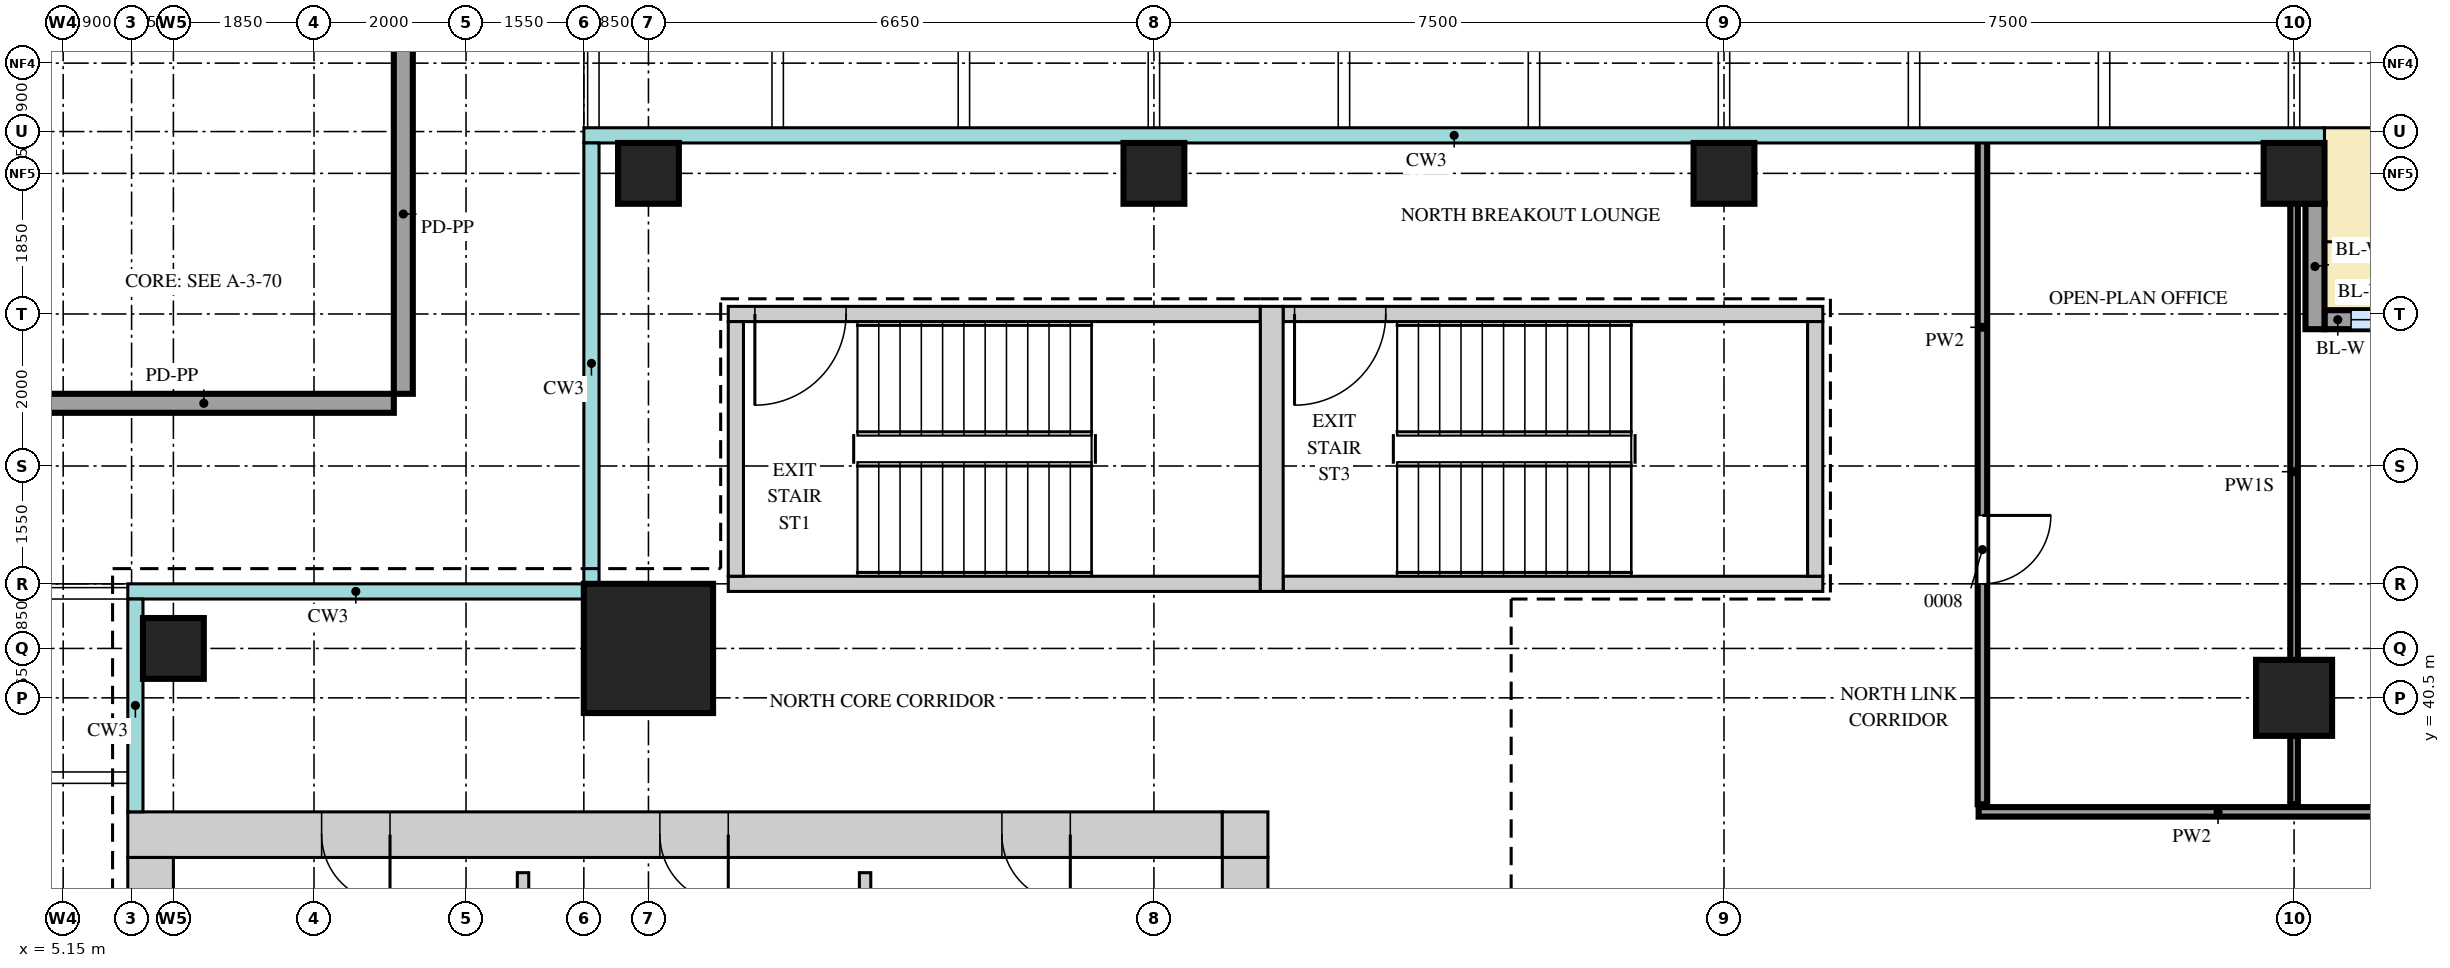
"""IFC4 building model, lengths in metres.
Left out: names, types, materials, properties, quantities, classifications, styles, units other than length and angle.
Written with IfcOpenShell. Run it as: python <this file> out.ifc"""

import sys

from ifc_helpers import new_model, si_unit, direction, frame, frame_2d, origin, origin_2d, place, context, subcontext, project, spatial, rectangle, extrude, source, transform, mapped, element, fill, save


model = new_model("IFC4")
c1 = context("Model", 3, precision=1e-05, world=origin(), true_north=direction((0.0, 1.0)))
c2 = subcontext(c1, "Body", "Model", "MODEL_VIEW")
j1 = project(units=[si_unit("LENGTHUNIT", "METRE"), si_unit("PLANEANGLEUNIT", "RADIAN")], contexts=[c1])
p1 = place(None, origin())
s1 = spatial("IfcSite", under=j1, at=p1, CompositionType="ELEMENT")
p2 = place(p1, origin())
s2 = spatial("IfcBuilding", under=s1, at=p2, CompositionType="ELEMENT")
p3 = place(p2, frame((0.0, 0.0, 282.2)))
s3 = spatial("IfcBuildingStorey", under=s2, at=p3, CompositionType="ELEMENT", Elevation=282.2)
m1 = source(origin(), c2, "Body", "SweptSolid", [
    extrude(rectangle(XDim=14.4, YDim=0.6, at=frame_2d((7.2, 0.0))), origin(), (0.0, 0.0, 1.0), 3.75),
])
p4 = place(p3, frame((6.0, 38.7, 0.0), z_axis=(0.0, 0.0, 1.0), x_axis=(1.0, 0.0, 0.0)))
e1 = element("IfcWall", 1, at=p4, inside=s3, PredefinedType="SHEAR", context=c2, shape_type="MappedRepresentation", body=[
    mapped(m1, transform((0.0, 0.0, 0.0))),
])
m2 = source(origin(), c2, "Body", "SweptSolid", [
    extrude(rectangle(XDim=0.9, YDim=2.1, at=frame_2d((0.45, 1.05))), frame((0.0, 0.31, 0.0), z_axis=(0.0, -1.0, 0.0), x_axis=(1.0, 0.0, 0.0)), (0.0, 0.0, 1.0), 0.62),
])
p5 = place(p4, frame((2.55, 0.0, 0.0)))
e2 = element("IfcOpeningElement", 2, at=p5, cuts=e1, PredefinedType="OPENING", context=c2, shape_type="MappedRepresentation", body=[
    mapped(m2, transform((0.0, 0.0, 0.0))),
])
p6 = place(p4, frame((7.0, 0.0, 0.0)))
e3 = element("IfcOpeningElement", 3, at=p6, cuts=e1, PredefinedType="OPENING", context=c2, shape_type="MappedRepresentation", body=[
    mapped(m2, transform((0.0, 0.0, 0.0))),
])
p7 = place(p4, frame((11.5, 0.0, 0.0)))
e4 = element("IfcOpeningElement", 4, at=p7, cuts=e1, PredefinedType="OPENING", context=c2, shape_type="MappedRepresentation", body=[
    mapped(m2, transform((0.0, 0.0, 0.0))),
])
m3 = source(origin(), c2, "Body", "SweptSolid", [
    extrude(rectangle(XDim=0.6, YDim=0.6, at=frame_2d((0.3, 0.0))), origin(), (0.0, 0.0, 1.0), 3.75),
])
p8 = place(p3, frame((20.4, 38.7, 0.0), z_axis=(0.0, 0.0, 1.0), x_axis=(1.0, 0.0, 0.0)))
e5 = element("IfcWall", 5, at=p8, inside=s3, PredefinedType="SHEAR", context=c2, shape_type="MappedRepresentation", body=[
    mapped(m3, transform((0.0, 0.0, 0.0))),
])
m4 = source(origin(), c2, "Body", "SweptSolid", [
    extrude(rectangle(XDim=22.8, YDim=0.6, at=frame_2d((11.4, 0.0))), origin(), (0.0, 0.0, 1.0), 3.75),
])
p9 = place(p3, frame((20.7, 15.6, 0.0), z_axis=(0.0, 0.0, 1.0), x_axis=(0.0, 1.0, 0.0)))
e6 = element("IfcWall", 6, at=p9, inside=s3, PredefinedType="SHEAR", context=c2, shape_type="MappedRepresentation", body=[
    mapped(m4, transform((0.0, 0.0, 0.0))),
])
m5 = source(origin(), c2, "Body", "SweptSolid", [
    extrude(rectangle(XDim=1.8, YDim=2.1, at=frame_2d((0.9, 1.05))), frame((0.0, 0.31, 0.0), z_axis=(0.0, -1.0, 0.0), x_axis=(1.0, 0.0, 0.0)), (0.0, 0.0, 1.0), 0.62),
])
p10 = place(p9, frame((10.9, 0.0, 0.0)))
e7 = element("IfcOpeningElement", 7, at=p10, cuts=e6, PredefinedType="OPENING", context=c2, shape_type="MappedRepresentation", body=[
    mapped(m5, transform((0.0, 0.0, 0.0))),
])
p11 = place(p9, frame((0.55, 0.0, 0.0)))
e8 = element("IfcOpeningElement", 8, at=p11, cuts=e6, PredefinedType="OPENING", context=c2, shape_type="MappedRepresentation", body=[
    mapped(m2, transform((0.0, 0.0, 0.0))),
])
m6 = source(origin(), c2, "Body", "SweptSolid", [
    extrude(rectangle(XDim=1.0, YDim=2.1, at=frame_2d((0.5, 1.05))), frame((0.0, 0.31, 0.0), z_axis=(0.0, -1.0, 0.0), x_axis=(1.0, 0.0, 0.0)), (0.0, 0.0, 1.0), 0.62),
])
p12 = place(p9, frame((2.3, 0.0, 0.0)))
e9 = element("IfcOpeningElement", 9, at=p12, cuts=e6, PredefinedType="OPENING", context=c2, shape_type="MappedRepresentation", body=[
    mapped(m6, transform((0.0, 0.0, 0.0))),
])
p13 = place(p9, frame((5.1, 0.0, 0.0)))
e10 = element("IfcOpeningElement", 10, at=p13, cuts=e6, PredefinedType="OPENING", context=c2, shape_type="MappedRepresentation", body=[
    mapped(m2, transform((0.0, 0.0, 0.0))),
])
p14 = place(p3, frame((6.3, 15.6, 0.0), z_axis=(0.0, 0.0, 1.0), x_axis=(0.0, 1.0, 0.0)))
e11 = element("IfcWall", 11, at=p14, inside=s3, PredefinedType="SHEAR", context=c2, shape_type="MappedRepresentation", body=[
    mapped(m4, transform((0.0, 0.0, 0.0))),
])
m7 = source(origin(), c2, "Body", "SweptSolid", [
    extrude(rectangle(XDim=7.0, YDim=0.2, at=frame_2d((3.5, 0.0))), origin(), (0.0, 0.0, 1.0), 3.75),
])
p15 = place(p3, frame((13.9, 45.55, 0.0), z_axis=(0.0, 0.0, 1.0), x_axis=(1.0, 0.0, 0.0)))
e12 = element("IfcWall", 12, at=p15, inside=s3, PredefinedType="SHEAR", context=c2, shape_type="MappedRepresentation", body=[
    mapped(m7, transform((0.0, 0.0, 0.0))),
])
m8 = source(origin(), c2, "Body", "SweptSolid", [
    extrude(rectangle(XDim=1.2, YDim=2.1, at=frame_2d((0.6, 1.05))), frame((0.0, 0.11, 0.0), z_axis=(0.0, -1.0, 0.0), x_axis=(1.0, 0.0, 0.0)), (0.0, 0.0, 1.0), 0.22),
])
p16 = place(p15, frame((0.35, 0.0, 0.0)))
e13 = element("IfcOpeningElement", 13, at=p16, cuts=e12, PredefinedType="OPENING", context=c2, shape_type="MappedRepresentation", body=[
    mapped(m8, transform((0.0, 0.0, 0.0))),
])
p17 = place(p3, frame((13.9, 42.0, 0.0), z_axis=(0.0, 0.0, 1.0), x_axis=(1.0, 0.0, 0.0)))
e14 = element("IfcWall", 14, at=p17, inside=s3, PredefinedType="SHEAR", context=c2, shape_type="MappedRepresentation", body=[
    mapped(m7, transform((0.0, 0.0, 0.0))),
])
m9 = source(origin(), c2, "Body", "SweptSolid", [
    extrude(rectangle(XDim=7.1, YDim=0.2, at=frame_2d((3.55, 0.0))), origin(), (0.0, 0.0, 1.0), 3.75),
])
p18 = place(p3, frame((21.2, 45.55, 0.0), z_axis=(0.0, 0.0, 1.0), x_axis=(1.0, 0.0, 0.0)))
e15 = element("IfcWall", 15, at=p18, inside=s3, PredefinedType="SHEAR", context=c2, shape_type="MappedRepresentation", body=[
    mapped(m9, transform((0.0, 0.0, 0.0))),
])
p19 = place(p18, frame((0.15, 0.0, 0.0)))
e16 = element("IfcOpeningElement", 16, at=p19, cuts=e15, PredefinedType="OPENING", context=c2, shape_type="MappedRepresentation", body=[
    mapped(m8, transform((0.0, 0.0, 0.0))),
])
p20 = place(p3, frame((21.2, 42.0, 0.0), z_axis=(0.0, 0.0, 1.0), x_axis=(1.0, 0.0, 0.0)))
e17 = element("IfcWall", 17, at=p20, inside=s3, PredefinedType="SHEAR", context=c2, shape_type="MappedRepresentation", body=[
    mapped(m9, transform((0.0, 0.0, 0.0))),
])
m10 = source(origin(), c2, "Body", "SweptSolid", [
    extrude(rectangle(XDim=3.75, YDim=0.3, at=frame_2d((1.875, 0.0))), origin(), (0.0, 0.0, 1.0), 3.75),
])
p21 = place(p3, frame((21.05, 41.9, 0.0), z_axis=(0.0, 0.0, 1.0), x_axis=(0.0, 1.0, 0.0)))
e18 = element("IfcWall", 18, at=p21, inside=s3, PredefinedType="SHEAR", context=c2, shape_type="MappedRepresentation", body=[
    mapped(m10, transform((0.0, 0.0, 0.0))),
])
m11 = source(origin(), c2, "Body", "SweptSolid", [
    extrude(rectangle(XDim=3.35, YDim=0.2, at=frame_2d((1.675, 0.0))), origin(), (0.0, 0.0, 1.0), 3.75),
])
for number, where, z_axis, x_axis in (
    (19, (14.0, 42.1, 0.0), (0.0, 0.0, 1.0), (0.0, 1.0, 0.0)),
    (20, (28.2, 42.1, 0.0), (0.0, 0.0, 1.0), (0.0, 1.0, 0.0)),
):
    element("IfcWall", number, at=place(p3, frame(where, z_axis=z_axis, x_axis=x_axis)), inside=s3, PredefinedType="SHEAR", context=c2, shape_type="MappedRepresentation", body=[
        mapped(m11, transform((0.0, 0.0, 0.0))),
    ])
m12 = source(origin(), c2, "Body", "SweptSolid", [
    extrude(rectangle(XDim=1.7, YDim=1.7, at=origin_2d()), origin(), (0.0, 0.0, 1.0), 3.75),
])
p22 = place(p3, frame((12.85, 41.15, 0.0), z_axis=(0.0, 0.0, 1.0), x_axis=(1.0, 0.0, 0.0)))
e21 = element("IfcColumn", 21, at=p22, inside=s3, PredefinedType="COLUMN", context=c2, shape_type="MappedRepresentation", body=[
    mapped(m12, transform((0.0, 0.0, 0.0))),
])
m13 = source(origin(), c2, "Body", "SweptSolid", [
    extrude(rectangle(XDim=0.8, YDim=0.8, at=origin_2d()), origin(), (0.0, 0.0, 1.0), 3.75),
])
for number, where, z_axis, x_axis in (
    (22, (12.85, 47.4, 0.0), (0.0, 0.0, 1.0), (1.0, 0.0, 0.0)),
    (23, (19.5, 47.4, 0.0), (0.0, 0.0, 1.0), (1.0, 0.0, 0.0)),
    (24, (27.0, 47.4, 0.0), (0.0, 0.0, 1.0), (1.0, 0.0, 0.0)),
    (25, (34.5, 47.4, 0.0), (0.0, 0.0, 1.0), (1.0, 0.0, 0.0)),
    (26, (6.6, 41.15, 0.0), (0.0, 0.0, 1.0), (1.0, 0.0, 0.0)),
):
    element("IfcColumn", number, at=place(p3, frame(where, z_axis=z_axis, x_axis=x_axis)), inside=s3, PredefinedType="COLUMN", context=c2, shape_type="MappedRepresentation", body=[
        mapped(m13, transform((0.0, 0.0, 0.0))),
    ])
m14 = source(origin(), c2, "Body", "SweptSolid", [
    extrude(rectangle(XDim=1.0, YDim=1.0, at=origin_2d()), origin(), (0.0, 0.0, 1.0), 3.75),
])
p23 = place(p3, frame((34.5, 40.5, 0.0), z_axis=(0.0, 0.0, 1.0), x_axis=(1.0, 0.0, 0.0)))
e27 = element("IfcColumn", 27, at=p23, inside=s3, PredefinedType="COLUMN", context=c2, shape_type="MappedRepresentation", body=[
    mapped(m14, transform((0.0, 0.0, 0.0))),
])
m15 = source(origin(), c2, "Body", "SweptSolid", [
    extrude(rectangle(XDim=5.85, YDim=0.25, at=frame_2d((2.925, 0.0))), origin(), (0.0, 0.0, 1.0), 3.75),
])
p24 = place(p3, frame((34.9, 45.475, 0.0), z_axis=(0.0, 0.0, 1.0), x_axis=(1.0, 0.0, 0.0)))
e28 = element("IfcWall", 28, at=p24, inside=s3, PredefinedType="SOLIDWALL", context=c2, shape_type="MappedRepresentation", body=[
    mapped(m15, transform((0.0, 0.0, 0.0))),
])
m16 = source(origin(), c2, "Body", "SweptSolid", [
    extrude(rectangle(XDim=1.4, YDim=2.4, at=frame_2d((0.7, 1.2))), frame((0.0, 0.135, 0.0), z_axis=(0.0, -1.0, 0.0), x_axis=(1.0, 0.0, 0.0)), (0.0, 0.0, 1.0), 0.27),
])
p25 = place(p24, frame((0.35, 0.0, 0.0)))
e29 = element("IfcOpeningElement", 29, at=p25, cuts=e28, PredefinedType="OPENING", context=c2, shape_type="MappedRepresentation", body=[
    mapped(m16, transform((0.0, 0.0, 0.0))),
])
p26 = place(p24, frame((4.15, 0.0, 0.0)))
e30 = element("IfcOpeningElement", 30, at=p26, cuts=e28, PredefinedType="OPENING", context=c2, shape_type="MappedRepresentation", body=[
    mapped(m16, transform((0.0, 0.0, 0.0))),
])
m17 = source(origin(), c2, "Body", "SweptSolid", [
    extrude(rectangle(XDim=1.8, YDim=2.4, at=frame_2d((0.9, 1.2))), frame((0.0, 0.135, 0.0), z_axis=(0.0, -1.0, 0.0), x_axis=(1.0, 0.0, 0.0)), (0.0, 0.0, 1.0), 0.27),
])
p27 = place(p24, frame((2.05, 0.0, 0.0)))
e31 = element("IfcOpeningElement", 31, at=p27, cuts=e28, PredefinedType="OPENING", context=c2, shape_type="MappedRepresentation", body=[
    mapped(m17, transform((0.0, 0.0, 0.0))),
])
m18 = source(origin(), c2, "Body", "SweptSolid", [
    extrude(rectangle(XDim=1.65, YDim=0.25, at=frame_2d((0.825, 0.0))), origin(), (0.0, 0.0, 1.0), 3.45),
])
p28 = place(p3, frame((34.775, 47.0, 0.0), z_axis=(0.0, 0.0, 1.0), x_axis=(0.0, -1.0, 0.0)))
e32 = element("IfcWall", 32, at=p28, inside=s3, PredefinedType="SOLIDWALL", context=c2, shape_type="MappedRepresentation", body=[
    mapped(m18, transform((0.0, 0.0, 0.0))),
])
m19 = source(origin(), c2, "Body", "SweptSolid", [
    extrude(rectangle(XDim=4.73, YDim=0.25, at=frame_2d((2.365, 0.0))), origin(), (0.0, 0.0, 1.0), 1.1),
])
p29 = place(p3, frame((9.625, 49.23, 0.0), z_axis=(0.0, 0.0, 1.0), x_axis=(0.0, -1.0, 0.0)))
e33 = element("IfcWall", 33, at=p29, inside=s3, PredefinedType="SOLIDWALL", context=c2, shape_type="MappedRepresentation", body=[
    mapped(m19, transform((0.0, 0.0, 0.0))),
])
m20 = source(origin(), c2, "Body", "SweptSolid", [
    extrude(rectangle(XDim=5.0, YDim=0.25, at=frame_2d((2.5, 0.0))), origin(), (0.0, 0.0, 1.0), 1.1),
])
p30 = place(p3, frame((9.5, 44.375, 0.0), z_axis=(0.0, 0.0, 1.0), x_axis=(-1.0, 0.0, 0.0)))
e34 = element("IfcWall", 34, at=p30, inside=s3, PredefinedType="SOLIDWALL", context=c2, shape_type="MappedRepresentation", body=[
    mapped(m20, transform((0.0, 0.0, 0.0))),
])
m21 = source(origin(), c2, "Body", "SweptSolid", [
    extrude(rectangle(XDim=6.0, YDim=0.15, at=frame_2d((3.0, 0.0))), origin(), (0.0, 0.0, 1.0), 3.8),
])
p31 = place(p3, frame((11.2, 32.2, 0.0), z_axis=(0.0, 0.0, 1.0), x_axis=(0.0, 1.0, 0.0)))
e35 = element("IfcWall", 35, at=p31, inside=s3, PredefinedType="PARTITIONING", context=c2, shape_type="MappedRepresentation", body=[
    mapped(m21, transform((0.0, 0.0, 0.0))),
])
m22 = source(origin(), c2, "Body", "SweptSolid", [
    extrude(rectangle(XDim=5.9, YDim=0.15, at=frame_2d((2.95, 0.0))), origin(), (0.0, 0.0, 1.0), 3.8),
])
p32 = place(p3, frame((15.7, 32.3, 0.0), z_axis=(0.0, 0.0, 1.0), x_axis=(0.0, 1.0, 0.0)))
e36 = element("IfcWall", 36, at=p32, inside=s3, PredefinedType="PARTITIONING", context=c2, shape_type="MappedRepresentation", body=[
    mapped(m22, transform((0.0, 0.0, 0.0))),
])
m23 = source(origin(), c2, "Body", "SweptSolid", [
    extrude(rectangle(XDim=12.1, YDim=0.125, at=frame_2d((6.05, 0.0))), origin(), (0.0, 0.0, 1.0), 3.8),
])
p33 = place(p3, frame((30.35, 39.0, 0.0), z_axis=(0.0, 0.0, 1.0), x_axis=(1.0, 0.0, 0.0)))
e37 = element("IfcWall", 37, at=p33, inside=s3, PredefinedType="PARTITIONING", context=c2, shape_type="MappedRepresentation", body=[
    mapped(m23, transform((0.0, 0.0, 0.0))),
])
m24 = source(origin(), c2, "Body", "SweptSolid", [
    extrude(rectangle(XDim=0.9, YDim=2.1, at=frame_2d((0.45, 1.05))), frame((0.0, 0.073, 0.0), z_axis=(0.0, -1.0, 0.0), x_axis=(1.0, 0.0, 0.0)), (0.0, 0.0, 1.0), 0.145),
])
p34 = place(p33, frame((6.3, 0.0, 0.0)))
e38 = element("IfcOpeningElement", 38, at=p34, cuts=e37, PredefinedType="OPENING", context=c2, shape_type="MappedRepresentation", body=[
    mapped(m24, transform((0.0, 0.0, 0.0))),
])
m25 = source(origin(), c2, "Body", "SweptSolid", [
    extrude(rectangle(XDim=8.75, YDim=0.125, at=frame_2d((4.375, 0.0))), origin(), (0.0, 0.0, 1.0), 3.8),
])
p35 = place(p3, frame((30.4, 39.1, 0.0), z_axis=(0.0, 0.0, 1.0), x_axis=(0.0, 1.0, 0.0)))
e39 = element("IfcWall", 39, at=p35, inside=s3, PredefinedType="PARTITIONING", context=c2, shape_type="MappedRepresentation", body=[
    mapped(m25, transform((0.0, 0.0, 0.0))),
])
p36 = place(p35, frame((2.9, 0.0, 0.0)))
e40 = element("IfcOpeningElement", 40, at=p36, cuts=e39, PredefinedType="OPENING", context=c2, shape_type="MappedRepresentation", body=[
    mapped(m24, transform((0.0, 0.0, 0.0))),
])
m26 = source(origin(), c2, "Body", "SweptSolid", [
    extrude(rectangle(XDim=8.75, YDim=0.1, at=frame_2d((4.375, 0.0))), origin(), (0.0, 0.0, 1.0), 3.35),
])
p37 = place(p3, frame((34.5, 39.1, 0.0), z_axis=(0.0, 0.0, 1.0), x_axis=(0.0, 1.0, 0.0)))
e41 = element("IfcWall", 41, at=p37, inside=s3, PredefinedType="PARTITIONING", context=c2, shape_type="MappedRepresentation", body=[
    mapped(m26, transform((0.0, 0.0, 0.0))),
])
m27 = source(origin(), c2, "Body", "SweptSolid", [
    extrude(rectangle(XDim=1.4, YDim=2.4, at=frame_2d((0.7, 1.2))), frame((0.0, 0.03, 0.0), z_axis=(0.0, -1.0, 0.0), x_axis=(1.0, 0.0, 0.0)), (0.0, 0.0, 1.0), 0.06),
])
p38 = place(p25, origin())
e42 = element("IfcWindow", 42, at=p38, inside=s3, PartitioningType="SINGLE_PANEL", PredefinedType="WINDOW", context=c2, shape_type="MappedRepresentation", body=[
    mapped(m27, transform((0.0, 0.0, 0.0))),
])
fill(e29, e42)
m28 = source(origin(), c2, "Body", "SweptSolid", [
    extrude(rectangle(XDim=0.9, YDim=2.1, at=frame_2d((0.45, 1.05))), frame((0.0, 0.25, 0.0), z_axis=(0.0, -1.0, 0.0), x_axis=(1.0, 0.0, 0.0)), (0.0, 0.0, 1.0), 0.5),
])
p39 = place(p5, origin())
e43 = element("IfcDoor", 43, at=p39, inside=s3, OperationType="SINGLE_SWING_RIGHT", PredefinedType="DOOR", context=c2, shape_type="MappedRepresentation", body=[
    mapped(m28, transform((0.0, 0.0, 0.0))),
])
fill(e2, e43)
p40 = place(p6, origin())
e44 = element("IfcDoor", 44, at=p40, inside=s3, OperationType="SINGLE_SWING_RIGHT", PredefinedType="DOOR", context=c2, shape_type="MappedRepresentation", body=[
    mapped(m28, transform((0.0, 0.0, 0.0))),
])
fill(e3, e44)
p41 = place(p7, origin())
e45 = element("IfcDoor", 45, at=p41, inside=s3, OperationType="SINGLE_SWING_RIGHT", PredefinedType="DOOR", context=c2, shape_type="MappedRepresentation", body=[
    mapped(m28, transform((0.0, 0.0, 0.0))),
])
fill(e4, e45)
m29 = source(origin(), c2, "Body", "SweptSolid", [
    extrude(rectangle(XDim=0.9, YDim=2.1, at=frame_2d((0.45, 1.05))), frame((0.0, 0.025, 0.0), z_axis=(0.0, -1.0, 0.0), x_axis=(1.0, 0.0, 0.0)), (0.0, 0.0, 1.0), 0.05),
])
p42 = place(p36, origin())
e46 = element("IfcDoor", 46, at=p42, inside=s3, OperationType="SINGLE_SWING_RIGHT", PredefinedType="DOOR", context=c2, shape_type="MappedRepresentation", body=[
    mapped(m29, transform((0.0, 0.0, 0.0))),
])
fill(e40, e46)
m30 = source(origin(), c2, "Body", "SweptSolid", [
    extrude(rectangle(XDim=1.2, YDim=2.1, at=frame_2d((0.6, 1.05))), frame((0.0, 0.025, 0.0), z_axis=(0.0, -1.0, 0.0), x_axis=(1.0, 0.0, 0.0)), (0.0, 0.0, 1.0), 0.05),
])
p43 = place(p16, origin())
e47 = element("IfcDoor", 47, at=p43, inside=s3, OperationType="SINGLE_SWING_LEFT", PredefinedType="DOOR", context=c2, shape_type="MappedRepresentation", body=[
    mapped(m30, transform((0.0, 0.0, 0.0))),
])
fill(e13, e47)
p44 = place(p19, origin())
e48 = element("IfcDoor", 48, at=p44, inside=s3, OperationType="SINGLE_SWING_LEFT", PredefinedType="DOOR", context=c2, shape_type="MappedRepresentation", body=[
    mapped(m30, transform((0.0, 0.0, 0.0))),
])
fill(e16, e48)
save(model, sys.argv[1])
